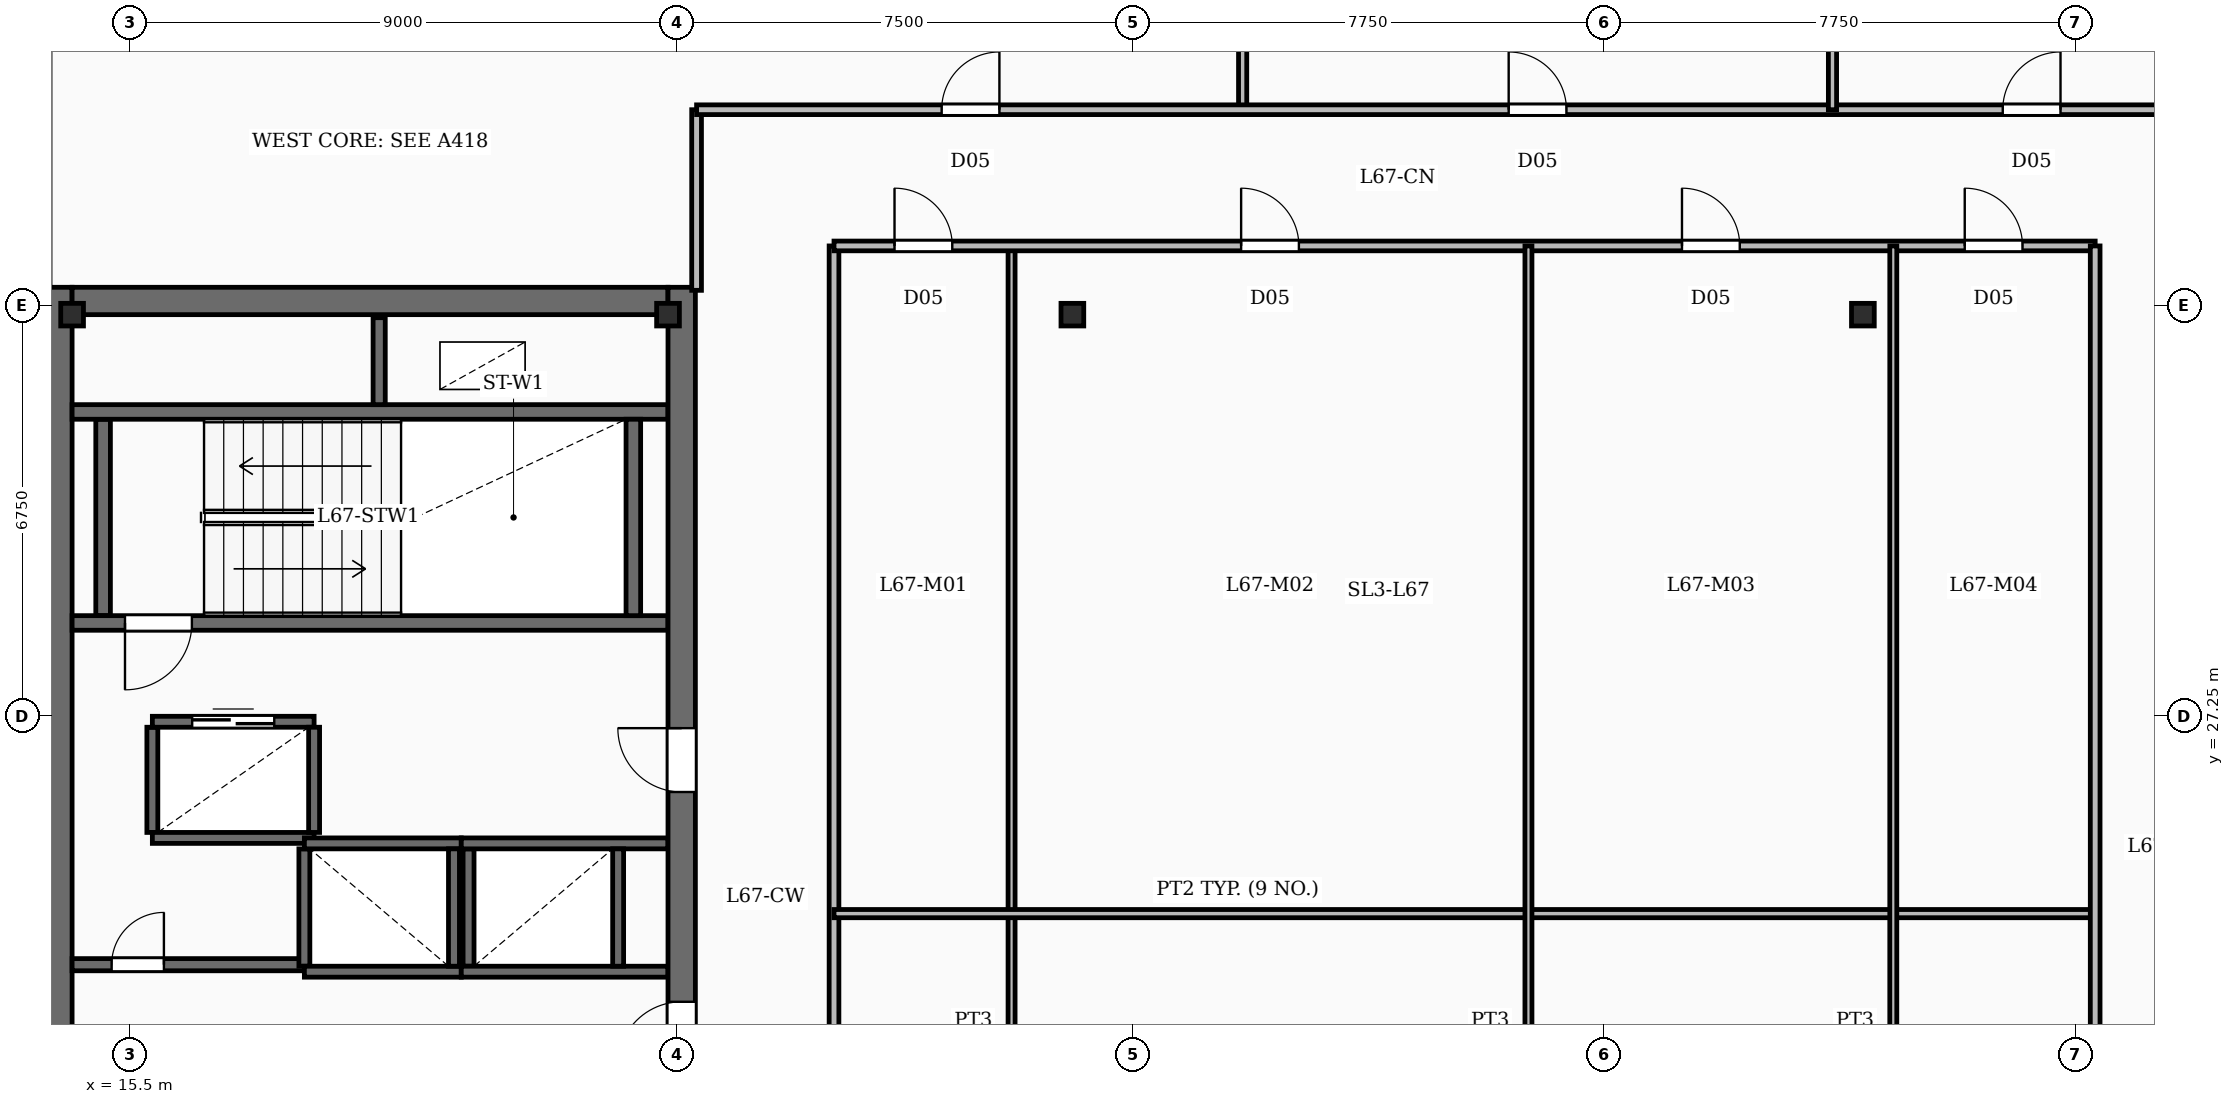
"""IFC4 building model, lengths in metres.
Left out: names, types, materials, properties, quantities, classifications, styles, units other than length and angle.
Written with IfcOpenShell. Run it as: python <this file> out.ifc"""

import sys

from ifc_helpers import new_model, si_unit, direction, frame, frame_2d, origin, origin_2d, place, context, subcontext, project, spatial, rectangle, i_section, extrude, element, fill, save


model = new_model("IFC4")
c1 = context("Model", 3, precision=1e-05, world=origin(), true_north=direction((0.0, 1.0)))
c2 = subcontext(c1, "Body", "Model", "MODEL_VIEW")
j1 = project(units=[si_unit("LENGTHUNIT", "METRE"), si_unit("PLANEANGLEUNIT", "RADIAN")], contexts=[c1])
p1 = place(None, origin())
s1 = spatial("IfcSite", under=j1, at=p1, CompositionType="ELEMENT")
p2 = place(p1, origin())
s2 = spatial("IfcBuilding", under=s1, at=p2, CompositionType="ELEMENT")
p3 = place(p2, frame((0.0, 0.0, 274.9)))
s3 = spatial("IfcBuildingStorey", under=s2, at=p3, CompositionType="ELEMENT", Elevation=274.9)
p4 = place(p3, frame((14.325, 19.0, -0.45), z_axis=(0.0, 0.0, 1.0), x_axis=(0.0, 1.0, 0.0)))
e1 = element("IfcWall", 1, at=p4, inside=s3, PredefinedType="SHEAR", context=c2, shape_type="SweptSolid", body=[
    extrude(rectangle(XDim=15.3, YDim=0.45, at=frame_2d((7.65, 0.0))), origin(), (0.0, 0.0, 1.0), 3.93),
])
p5 = place(p3, frame((24.575, 19.0, -0.45), z_axis=(0.0, 0.0, 1.0), x_axis=(0.0, 1.0, 0.0)))
e2 = element("IfcWall", 2, at=p5, inside=s3, PredefinedType="SHEAR", context=c2, shape_type="SweptSolid", body=[
    extrude(rectangle(XDim=15.3, YDim=0.45, at=frame_2d((7.65, 0.0))), origin(), (0.0, 0.0, 1.0), 3.93),
])
p6 = place(p5, frame((2.5, 0.0, 0.45)))
e3 = element("IfcOpeningElement", 3, at=p6, cuts=e2, PredefinedType="OPENING", context=c2, shape_type="SweptSolid", body=[
    extrude(rectangle(XDim=1.05, YDim=2.15, at=frame_2d((0.525, 1.075))), frame((0.0, 0.235, 0.0), z_axis=(0.0, -1.0, 0.0), x_axis=(1.0, 0.0, 0.0)), (0.0, 0.0, 1.0), 0.47),
])
p7 = place(p5, frame((7.0, 0.0, 0.45)))
e4 = element("IfcOpeningElement", 4, at=p7, cuts=e2, PredefinedType="OPENING", context=c2, shape_type="SweptSolid", body=[
    extrude(rectangle(XDim=1.05, YDim=2.15, at=frame_2d((0.525, 1.075))), frame((0.0, 0.235, 0.0), z_axis=(0.0, -1.0, 0.0), x_axis=(1.0, 0.0, 0.0)), (0.0, 0.0, 1.0), 0.47),
])
p8 = place(p3, frame((14.55, 34.075, -0.45), z_axis=(0.0, 0.0, 1.0), x_axis=(1.0, 0.0, 0.0)))
e5 = element("IfcWall", 5, at=p8, inside=s3, PredefinedType="SHEAR", context=c2, shape_type="SweptSolid", body=[
    extrude(rectangle(XDim=9.8, YDim=0.45, at=frame_2d((4.9, 0.0))), origin(), (0.0, 0.0, 1.0), 3.93),
])
for number, where, z_axis, x_axis in (
    (6, (14.55, 33.85, -0.45), (0.0, 0.0, 1.0), (1.0, 0.0, 0.0)),
    (7, (24.35, 33.85, -0.45), (0.0, 0.0, 1.0), (1.0, 0.0, 0.0)),
    (8, (31.0, 33.85, -0.45), (0.0, 0.0, 1.0), (1.0, 0.0, 0.0)),
    (9, (44.0, 33.85, -0.45), (0.0, 0.0, 1.0), (1.0, 0.0, 0.0)),
):
    element("IfcColumn", number, at=place(p3, frame(where, z_axis=z_axis, x_axis=x_axis)), inside=s3, PredefinedType="COLUMN", context=c2, shape_type="SweptSolid", body=[
        extrude(i_section(OverallWidth=0.374, OverallDepth=0.372, WebThickness=0.016, FlangeThickness=0.026, FilletRadius=0.02, at=origin_2d()), origin(), (0.0, 0.0, 1.0), 3.93),
    ])
p9 = place(p3, frame((24.35, 28.78, 0.0), z_axis=(0.0, 0.0, 1.0), x_axis=(-1.0, 0.0, 0.0)))
e10 = element("IfcWall", 10, at=p9, inside=s3, PredefinedType="SOLIDWALL", context=c2, shape_type="SweptSolid", body=[
    extrude(rectangle(XDim=9.8, YDim=0.24, at=frame_2d((4.9, 0.0))), origin(), (0.0, 0.0, 1.0), 3.48),
])
p10 = place(p9, frame((7.83, 0.0, 0.0)))
e11 = element("IfcOpeningElement", 11, at=p10, cuts=e10, PredefinedType="OPENING", context=c2, shape_type="SweptSolid", body=[
    extrude(rectangle(XDim=1.1, YDim=2.15, at=frame_2d((0.55, 1.075))), frame((0.0, 0.13, 0.0), z_axis=(0.0, -1.0, 0.0), x_axis=(1.0, 0.0, 0.0)), (0.0, 0.0, 1.0), 0.26),
])
p11 = place(p3, frame((14.55, 32.25, 0.0), z_axis=(0.0, 0.0, 1.0), x_axis=(1.0, 0.0, 0.0)))
e12 = element("IfcWall", 12, at=p11, inside=s3, PredefinedType="SOLIDWALL", context=c2, shape_type="SweptSolid", body=[
    extrude(rectangle(XDim=9.8, YDim=0.24, at=frame_2d((4.9, 0.0))), origin(), (0.0, 0.0, 1.0), 3.48),
])
for number, where, z_axis, x_axis in (
    (13, (15.06, 28.9, 0.0), (0.0, 0.0, 1.0), (0.0, 1.0, 0.0)),
    (14, (23.78, 28.9, 0.0), (0.0, 0.0, 1.0), (0.0, 1.0, 0.0)),
):
    element("IfcWall", number, at=place(p3, frame(where, z_axis=z_axis, x_axis=x_axis)), inside=s3, PredefinedType="SOLIDWALL", context=c2, shape_type="SweptSolid", body=[
        extrude(rectangle(XDim=3.23, YDim=0.24, at=frame_2d((1.615, 0.0))), origin(), (0.0, 0.0, 1.0), 3.48),
    ])
p12 = place(p3, frame((19.6, 32.37, 0.0), z_axis=(0.0, 0.0, 1.0), x_axis=(0.0, 1.0, 0.0)))
e15 = element("IfcWall", 15, at=p12, inside=s3, PredefinedType="SOLIDWALL", context=c2, shape_type="SweptSolid", body=[
    extrude(rectangle(XDim=1.43, YDim=0.2, at=frame_2d((0.715, 0.0))), origin(), (0.0, 0.0, 1.0), 3.48),
])
for number, where, z_axis, x_axis in (
    (16, (18.37, 25.155, 0.0), (0.0, 0.0, 1.0), (1.0, 0.0, 0.0)),
    (17, (18.37, 23.045, 0.0), (0.0, 0.0, 1.0), (1.0, 0.0, 0.0)),
):
    element("IfcWall", number, at=place(p3, frame(where, z_axis=z_axis, x_axis=x_axis)), inside=s3, PredefinedType="SOLIDWALL", context=c2, shape_type="SweptSolid", body=[
        extrude(rectangle(XDim=2.58, YDim=0.18, at=frame_2d((1.29, 0.0))), origin(), (0.0, 0.0, 1.0), 3.48),
    ])
for number, where, z_axis, x_axis in (
    (18, (18.37, 23.135, 0.0), (0.0, 0.0, 1.0), (0.0, 1.0, 0.0)),
    (19, (20.83, 23.135, 0.0), (0.0, 0.0, 1.0), (0.0, 1.0, 0.0)),
):
    element("IfcWall", number, at=place(p3, frame(where, z_axis=z_axis, x_axis=x_axis)), inside=s3, PredefinedType="SOLIDWALL", context=c2, shape_type="SweptSolid", body=[
        extrude(rectangle(XDim=1.93, YDim=0.18, at=frame_2d((0.965, 0.0))), origin(), (0.0, 0.0, 1.0), 3.48),
    ])
for number, where, z_axis, x_axis in (
    (20, (20.95, 25.155, 0.0), (0.0, 0.0, 1.0), (1.0, 0.0, 0.0)),
    (21, (20.95, 23.045, 0.0), (0.0, 0.0, 1.0), (1.0, 0.0, 0.0)),
):
    element("IfcWall", number, at=place(p3, frame(where, z_axis=z_axis, x_axis=x_axis)), inside=s3, PredefinedType="SOLIDWALL", context=c2, shape_type="SweptSolid", body=[
        extrude(rectangle(XDim=3.4, YDim=0.18, at=frame_2d((1.7, 0.0))), origin(), (0.0, 0.0, 1.0), 3.48),
    ])
for number, where, z_axis, x_axis in (
    (22, (21.07, 23.135, 0.0), (0.0, 0.0, 1.0), (0.0, 1.0, 0.0)),
    (23, (23.53, 23.135, 0.0), (0.0, 0.0, 1.0), (0.0, 1.0, 0.0)),
):
    element("IfcWall", number, at=place(p3, frame(where, z_axis=z_axis, x_axis=x_axis)), inside=s3, PredefinedType="SOLIDWALL", context=c2, shape_type="SweptSolid", body=[
        extrude(rectangle(XDim=1.93, YDim=0.18, at=frame_2d((0.965, 0.0))), origin(), (0.0, 0.0, 1.0), 3.48),
    ])
p13 = place(p3, frame((15.87, 27.155, 0.0), z_axis=(0.0, 0.0, 1.0), x_axis=(1.0, 0.0, 0.0)))
e24 = element("IfcWall", 24, at=p13, inside=s3, PredefinedType="SOLIDWALL", context=c2, shape_type="SweptSolid", body=[
    extrude(rectangle(XDim=2.66, YDim=0.18, at=frame_2d((1.33, 0.0))), origin(), (0.0, 0.0, 1.0), 3.48),
])
p14 = place(p13, frame((0.655, 0.0, 0.0)))
e25 = element("IfcOpeningElement", 25, at=p14, cuts=e24, PredefinedType="OPENING", context=c2, shape_type="SweptSolid", body=[
    extrude(rectangle(XDim=1.35, YDim=2.3, at=frame_2d((0.675, 1.15))), frame((0.0, 0.1, 0.0), z_axis=(0.0, -1.0, 0.0), x_axis=(1.0, 0.0, 0.0)), (0.0, 0.0, 1.0), 0.2),
])
p15 = place(p3, frame((15.87, 25.245, 0.0), z_axis=(0.0, 0.0, 1.0), x_axis=(1.0, 0.0, 0.0)))
e26 = element("IfcWall", 26, at=p15, inside=s3, PredefinedType="SOLIDWALL", context=c2, shape_type="SweptSolid", body=[
    extrude(rectangle(XDim=2.66, YDim=0.18, at=frame_2d((1.33, 0.0))), origin(), (0.0, 0.0, 1.0), 3.48),
])
for number, where, z_axis, x_axis in (
    (27, (15.87, 25.335, 0.0), (0.0, 0.0, 1.0), (0.0, 1.0, 0.0)),
    (28, (18.53, 25.335, 0.0), (0.0, 0.0, 1.0), (0.0, 1.0, 0.0)),
):
    element("IfcWall", number, at=place(p3, frame(where, z_axis=z_axis, x_axis=x_axis)), inside=s3, PredefinedType="SOLIDWALL", context=c2, shape_type="SweptSolid", body=[
        extrude(rectangle(XDim=1.73, YDim=0.18, at=frame_2d((0.865, 0.0))), origin(), (0.0, 0.0, 1.0), 3.48),
    ])
p16 = place(p3, frame((14.55, 23.16, 0.0), z_axis=(0.0, 0.0, 1.0), x_axis=(1.0, 0.0, 0.0)))
e29 = element("IfcWall", 29, at=p16, inside=s3, PredefinedType="SOLIDWALL", context=c2, shape_type="SweptSolid", body=[
    extrude(rectangle(XDim=3.82, YDim=0.2, at=frame_2d((1.91, 0.0))), origin(), (0.0, 0.0, 1.0), 2.54),
])
p17 = place(p16, frame((0.65, 0.0, 0.0)))
e30 = element("IfcOpeningElement", 30, at=p17, cuts=e29, PredefinedType="OPENING", context=c2, shape_type="SweptSolid", body=[
    extrude(rectangle(XDim=0.86, YDim=2.05, at=frame_2d((0.43, 1.025))), frame((0.0, 0.11, 0.0), z_axis=(0.0, -1.0, 0.0), x_axis=(1.0, 0.0, 0.0)), (0.0, 0.0, 1.0), 0.22),
])
p18 = place(p3, frame((33.8, 37.22, 0.0), z_axis=(0.0, 0.0, 1.0), x_axis=(0.0, 1.0, 0.0)))
e31 = element("IfcWall", 31, at=p18, inside=s3, PredefinedType="PARTITIONING", context=c2, shape_type="SweptSolid", body=[
    extrude(rectangle(XDim=14.61, YDim=0.135, at=frame_2d((7.305, 0.0))), origin(), (0.0, 0.0, 1.0), 2.54),
])
p19 = place(p3, frame((43.5, 37.22, 0.0), z_axis=(0.0, 0.0, 1.0), x_axis=(0.0, 1.0, 0.0)))
e32 = element("IfcWall", 32, at=p19, inside=s3, PredefinedType="PARTITIONING", context=c2, shape_type="SweptSolid", body=[
    extrude(rectangle(XDim=14.695, YDim=0.135, at=frame_2d((7.347, 0.0))), origin(), (0.0, 0.0, 1.0), 2.54),
])
p20 = place(p3, frame((24.82, 34.25, 0.0), z_axis=(0.0, 0.0, 1.0), x_axis=(0.0, 1.0, 0.0)))
e33 = element("IfcWall", 33, at=p20, inside=s3, PredefinedType="PARTITIONING", context=c2, shape_type="SweptSolid", body=[
    extrude(rectangle(XDim=2.97, YDim=0.16, at=frame_2d((1.485, 0.0))), origin(), (0.0, 0.0, 1.0), 2.54),
])
p21 = place(p3, frame((24.82, 37.22, 0.0), z_axis=(0.0, 0.0, 1.0), x_axis=(1.0, 0.0, 0.0)))
e34 = element("IfcWall", 34, at=p21, inside=s3, PredefinedType="PARTITIONING", context=c2, shape_type="SweptSolid", body=[
    extrude(rectangle(XDim=25.26, YDim=0.16, at=frame_2d((12.63, 0.0))), origin(), (0.0, 0.0, 1.0), 2.54),
])
p22 = place(p21, frame((4.03, 0.0, 0.0)))
e35 = element("IfcOpeningElement", 35, at=p22, cuts=e34, PredefinedType="OPENING", context=c2, shape_type="SweptSolid", body=[
    extrude(rectangle(XDim=0.95, YDim=2.15, at=frame_2d((0.475, 1.075))), frame((0.0, 0.09, 0.0), z_axis=(0.0, -1.0, 0.0), x_axis=(1.0, 0.0, 0.0)), (0.0, 0.0, 1.0), 0.18),
])
p23 = place(p21, frame((13.355, 0.0, 0.0)))
e36 = element("IfcOpeningElement", 36, at=p23, cuts=e34, PredefinedType="OPENING", context=c2, shape_type="SweptSolid", body=[
    extrude(rectangle(XDim=0.95, YDim=2.15, at=frame_2d((0.475, 1.075))), frame((0.0, 0.09, 0.0), z_axis=(0.0, -1.0, 0.0), x_axis=(1.0, 0.0, 0.0)), (0.0, 0.0, 1.0), 0.18),
])
p24 = place(p21, frame((21.48, 0.0, 0.0)))
e37 = element("IfcOpeningElement", 37, at=p24, cuts=e34, PredefinedType="OPENING", context=c2, shape_type="SweptSolid", body=[
    extrude(rectangle(XDim=0.95, YDim=2.15, at=frame_2d((0.475, 1.075))), frame((0.0, 0.09, 0.0), z_axis=(0.0, -1.0, 0.0), x_axis=(1.0, 0.0, 0.0)), (0.0, 0.0, 1.0), 0.18),
])
for number, where, z_axis, x_axis in (
    (38, (30.0, 15.38, 0.0), (0.0, 0.0, 1.0), (0.0, 1.0, 0.0)),
    (39, (38.5, 15.38, 0.0), (0.0, 0.0, 1.0), (0.0, 1.0, 0.0)),
    (40, (44.5, 15.38, 0.0), (0.0, 0.0, 1.0), (0.0, 1.0, 0.0)),
):
    element("IfcWall", number, at=place(p3, frame(where, z_axis=z_axis, x_axis=x_axis)), inside=s3, PredefinedType="PARTITIONING", context=c2, shape_type="SweptSolid", body=[
        extrude(rectangle(XDim=19.6, YDim=0.115, at=frame_2d((9.8, 0.0))), origin(), (0.0, 0.0, 1.0), 2.54),
    ])
p25 = place(p3, frame((27.08, 24.0, 0.0), z_axis=(0.0, 0.0, 1.0), x_axis=(1.0, 0.0, 0.0)))
e41 = element("IfcWall", 41, at=p25, inside=s3, PredefinedType="PARTITIONING", context=c2, shape_type="SweptSolid", body=[
    extrude(rectangle(XDim=20.74, YDim=0.135, at=frame_2d((10.37, 0.0))), origin(), (0.0, 0.0, 1.0), 2.54),
])
p26 = place(p3, frame((27.08, 34.98, 0.0), z_axis=(0.0, 0.0, 1.0), x_axis=(1.0, 0.0, 0.0)))
e42 = element("IfcWall", 42, at=p26, inside=s3, PredefinedType="PARTITIONING", context=c2, shape_type="SweptSolid", body=[
    extrude(rectangle(XDim=20.74, YDim=0.16, at=frame_2d((10.37, 0.0))), origin(), (0.0, 0.0, 1.0), 2.54),
])
p27 = place(p26, frame((0.995, 0.0, 0.0)))
e43 = element("IfcOpeningElement", 43, at=p27, cuts=e42, PredefinedType="OPENING", context=c2, shape_type="SweptSolid", body=[
    extrude(rectangle(XDim=0.95, YDim=2.15, at=frame_2d((0.475, 1.075))), frame((0.0, 0.09, 0.0), z_axis=(0.0, -1.0, 0.0), x_axis=(1.0, 0.0, 0.0)), (0.0, 0.0, 1.0), 0.18),
])
p28 = place(p26, frame((6.695, 0.0, 0.0)))
e44 = element("IfcOpeningElement", 44, at=p28, cuts=e42, PredefinedType="OPENING", context=c2, shape_type="SweptSolid", body=[
    extrude(rectangle(XDim=0.95, YDim=2.15, at=frame_2d((0.475, 1.075))), frame((0.0, 0.09, 0.0), z_axis=(0.0, -1.0, 0.0), x_axis=(1.0, 0.0, 0.0)), (0.0, 0.0, 1.0), 0.18),
])
p29 = place(p26, frame((13.945, 0.0, 0.0)))
e45 = element("IfcOpeningElement", 45, at=p29, cuts=e42, PredefinedType="OPENING", context=c2, shape_type="SweptSolid", body=[
    extrude(rectangle(XDim=0.95, YDim=2.15, at=frame_2d((0.475, 1.075))), frame((0.0, 0.09, 0.0), z_axis=(0.0, -1.0, 0.0), x_axis=(1.0, 0.0, 0.0)), (0.0, 0.0, 1.0), 0.18),
])
p30 = place(p26, frame((18.595, 0.0, 0.0)))
e46 = element("IfcOpeningElement", 46, at=p30, cuts=e42, PredefinedType="OPENING", context=c2, shape_type="SweptSolid", body=[
    extrude(rectangle(XDim=0.95, YDim=2.15, at=frame_2d((0.475, 1.075))), frame((0.0, 0.09, 0.0), z_axis=(0.0, -1.0, 0.0), x_axis=(1.0, 0.0, 0.0)), (0.0, 0.0, 1.0), 0.18),
])
for number, where, z_axis, x_axis in (
    (47, (27.08, 15.38, 0.0), (0.0, 0.0, 1.0), (0.0, 1.0, 0.0)),
    (48, (47.82, 15.38, 0.0), (0.0, 0.0, 1.0), (0.0, 1.0, 0.0)),
):
    element("IfcWall", number, at=place(p3, frame(where, z_axis=z_axis, x_axis=x_axis)), inside=s3, PredefinedType="PARTITIONING", context=c2, shape_type="SweptSolid", body=[
        extrude(rectangle(XDim=19.6, YDim=0.16, at=frame_2d((9.8, 0.0))), origin(), (0.0, 0.0, 1.0), 2.54),
    ])
p31 = place(p6, origin())
e49 = element("IfcDoor", 49, at=p31, inside=s3, OperationType="SINGLE_SWING_LEFT", PredefinedType="DOOR", context=c2, shape_type="SweptSolid", body=[
    extrude(rectangle(XDim=1.05, YDim=2.15, at=frame_2d((0.525, 1.075))), frame((0.0, 0.025, 0.0), z_axis=(0.0, -1.0, 0.0), x_axis=(1.0, 0.0, 0.0)), (0.0, 0.0, 1.0), 0.05),
])
fill(e3, e49)
p32 = place(p7, origin())
e50 = element("IfcDoor", 50, at=p32, inside=s3, OperationType="SINGLE_SWING_RIGHT", PredefinedType="DOOR", context=c2, shape_type="SweptSolid", body=[
    extrude(rectangle(XDim=1.05, YDim=2.15, at=frame_2d((0.525, 1.075))), frame((0.0, 0.025, 0.0), z_axis=(0.0, -1.0, 0.0), x_axis=(1.0, 0.0, 0.0)), (0.0, 0.0, 1.0), 0.05),
])
fill(e4, e50)
p33 = place(p10, origin())
e51 = element("IfcDoor", 51, at=p33, inside=s3, OperationType="SINGLE_SWING_RIGHT", PredefinedType="DOOR", context=c2, shape_type="SweptSolid", body=[
    extrude(rectangle(XDim=1.1, YDim=2.15, at=frame_2d((0.55, 1.075))), frame((0.0, 0.025, 0.0), z_axis=(0.0, -1.0, 0.0), x_axis=(1.0, 0.0, 0.0)), (0.0, 0.0, 1.0), 0.05),
])
fill(e11, e51)
p34 = place(p14, origin())
e52 = element("IfcDoor", 52, at=p34, inside=s3, OperationType="DOUBLE_DOOR_SLIDING", PredefinedType="DOOR", context=c2, shape_type="SweptSolid", body=[
    extrude(rectangle(XDim=1.35, YDim=2.3, at=frame_2d((0.675, 1.15))), frame((0.0, 0.025, 0.0), z_axis=(0.0, -1.0, 0.0), x_axis=(1.0, 0.0, 0.0)), (0.0, 0.0, 1.0), 0.05),
])
fill(e25, e52)
p35 = place(p17, origin())
e53 = element("IfcDoor", 53, at=p35, inside=s3, OperationType="SINGLE_SWING_RIGHT", PredefinedType="DOOR", context=c2, shape_type="SweptSolid", body=[
    extrude(rectangle(XDim=0.86, YDim=2.05, at=frame_2d((0.43, 1.025))), frame((0.0, 0.025, 0.0), z_axis=(0.0, -1.0, 0.0), x_axis=(1.0, 0.0, 0.0)), (0.0, 0.0, 1.0), 0.05),
])
fill(e30, e53)
p36 = place(p22, origin())
e54 = element("IfcDoor", 54, at=p36, inside=s3, OperationType="SINGLE_SWING_RIGHT", PredefinedType="DOOR", context=c2, shape_type="SweptSolid", body=[
    extrude(rectangle(XDim=0.95, YDim=2.15, at=frame_2d((0.475, 1.075))), frame((0.0, 0.025, 0.0), z_axis=(0.0, -1.0, 0.0), x_axis=(1.0, 0.0, 0.0)), (0.0, 0.0, 1.0), 0.05),
])
fill(e35, e54)
p37 = place(p23, origin())
e55 = element("IfcDoor", 55, at=p37, inside=s3, OperationType="SINGLE_SWING_LEFT", PredefinedType="DOOR", context=c2, shape_type="SweptSolid", body=[
    extrude(rectangle(XDim=0.95, YDim=2.15, at=frame_2d((0.475, 1.075))), frame((0.0, 0.025, 0.0), z_axis=(0.0, -1.0, 0.0), x_axis=(1.0, 0.0, 0.0)), (0.0, 0.0, 1.0), 0.05),
])
fill(e36, e55)
p38 = place(p24, origin())
e56 = element("IfcDoor", 56, at=p38, inside=s3, OperationType="SINGLE_SWING_RIGHT", PredefinedType="DOOR", context=c2, shape_type="SweptSolid", body=[
    extrude(rectangle(XDim=0.95, YDim=2.15, at=frame_2d((0.475, 1.075))), frame((0.0, 0.025, 0.0), z_axis=(0.0, -1.0, 0.0), x_axis=(1.0, 0.0, 0.0)), (0.0, 0.0, 1.0), 0.05),
])
fill(e37, e56)
p39 = place(p27, origin())
e57 = element("IfcDoor", 57, at=p39, inside=s3, OperationType="SINGLE_SWING_LEFT", PredefinedType="DOOR", context=c2, shape_type="SweptSolid", body=[
    extrude(rectangle(XDim=0.95, YDim=2.15, at=frame_2d((0.475, 1.075))), frame((0.0, 0.025, 0.0), z_axis=(0.0, -1.0, 0.0), x_axis=(1.0, 0.0, 0.0)), (0.0, 0.0, 1.0), 0.05),
])
fill(e43, e57)
p40 = place(p28, origin())
e58 = element("IfcDoor", 58, at=p40, inside=s3, OperationType="SINGLE_SWING_LEFT", PredefinedType="DOOR", context=c2, shape_type="SweptSolid", body=[
    extrude(rectangle(XDim=0.95, YDim=2.15, at=frame_2d((0.475, 1.075))), frame((0.0, 0.025, 0.0), z_axis=(0.0, -1.0, 0.0), x_axis=(1.0, 0.0, 0.0)), (0.0, 0.0, 1.0), 0.05),
])
fill(e44, e58)
p41 = place(p29, origin())
e59 = element("IfcDoor", 59, at=p41, inside=s3, OperationType="SINGLE_SWING_LEFT", PredefinedType="DOOR", context=c2, shape_type="SweptSolid", body=[
    extrude(rectangle(XDim=0.95, YDim=2.15, at=frame_2d((0.475, 1.075))), frame((0.0, 0.025, 0.0), z_axis=(0.0, -1.0, 0.0), x_axis=(1.0, 0.0, 0.0)), (0.0, 0.0, 1.0), 0.05),
])
fill(e45, e59)
p42 = place(p30, origin())
e60 = element("IfcDoor", 60, at=p42, inside=s3, OperationType="SINGLE_SWING_LEFT", PredefinedType="DOOR", context=c2, shape_type="SweptSolid", body=[
    extrude(rectangle(XDim=0.95, YDim=2.15, at=frame_2d((0.475, 1.075))), frame((0.0, 0.025, 0.0), z_axis=(0.0, -1.0, 0.0), x_axis=(1.0, 0.0, 0.0)), (0.0, 0.0, 1.0), 0.05),
])
fill(e46, e60)
save(model, sys.argv[1])
